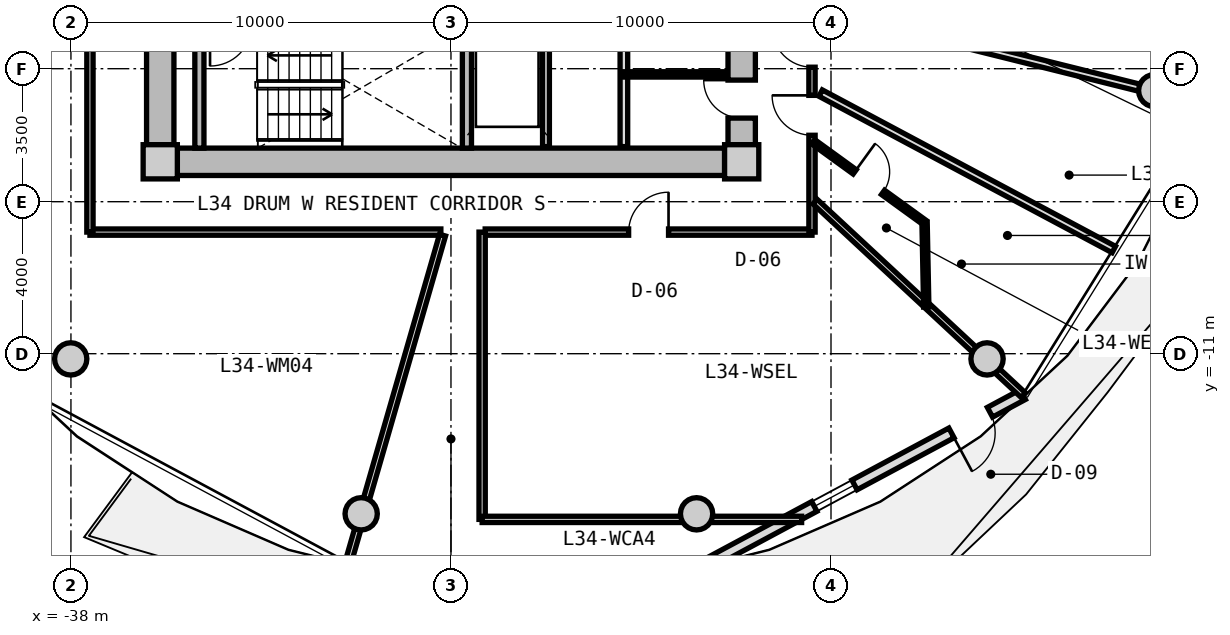
"""IFC4 building model, lengths in metres.
Left out: names, types, materials, properties, quantities, classifications, styles, units other than length and angle.
Written with IfcOpenShell. Run it as: python <this file> out.ifc"""

import sys

from ifc_helpers import new_model, si_unit, direction, frame, frame_2d, origin, origin_2d, place, context, subcontext, project, spatial, rectangle, circle, extrude, source, transform, mapped, element, fill, save


model = new_model("IFC4")
c1 = context("Model", 3, precision=1e-05, world=origin(), true_north=direction((0.0, 1.0)))
c2 = subcontext(c1, "Body", "Model", "MODEL_VIEW")
j1 = project(units=[si_unit("LENGTHUNIT", "METRE"), si_unit("PLANEANGLEUNIT", "RADIAN")], contexts=[c1])
p1 = place(None, origin())
s1 = spatial("IfcSite", under=j1, at=p1, CompositionType="ELEMENT")
p2 = place(p1, origin())
s2 = spatial("IfcBuilding", under=s1, at=p2, CompositionType="ELEMENT")
p3 = place(p2, frame((0.0, 0.0, 111.5)))
s3 = spatial("IfcBuildingStorey", under=s2, at=p3, CompositionType="ELEMENT", Elevation=111.5)
m1 = source(origin(), c2, "Body", "SweptSolid", [
    extrude(rectangle(XDim=0.9, YDim=0.9, at=origin_2d()), origin(), (0.0, 0.0, 1.0), 3.05),
])
for number, where, z_axis, x_axis in (
    (1, (-35.65, -5.95, 0.0), (0.0, 0.0, 1.0), (1.0, 0.0, 0.0)),
    (2, (-20.35, -5.95, 0.0), (0.0, 0.0, 1.0), (1.0, 0.0, 0.0)),
):
    element("IfcColumn", number, at=place(p3, frame(where, z_axis=z_axis, x_axis=x_axis)), inside=s3, PredefinedType="COLUMN", context=c2, shape_type="MappedRepresentation", body=[
        mapped(m1, transform((0.0, 0.0, 0.0), x_axis=(1.0, 0.0, 0.0), y_axis=(0.0, 1.0, 0.0), z_axis=(0.0, 0.0, 1.0), scale=1.0)),
    ])
m2 = source(origin(), c2, "Body", "SweptSolid", [
    extrude(rectangle(XDim=14.4, YDim=0.72, at=frame_2d((7.2, 0.0))), origin(), (0.0, 0.0, 1.0), 2.79),
])
p4 = place(p3, frame((-20.8, -5.95, 0.0), z_axis=(0.0, 0.0, 1.0), x_axis=(-1.0, 0.0, 0.0)))
e3 = element("IfcWall", 3, at=p4, inside=s3, PredefinedType="SHEAR", context=c2, shape_type="MappedRepresentation", body=[
    mapped(m2, transform((0.0, 0.0, 0.0), x_axis=(1.0, 0.0, 0.0), y_axis=(0.0, 1.0, 0.0), z_axis=(0.0, 0.0, 1.0), scale=1.0)),
])
m3 = source(origin(), c2, "Body", "SweptSolid", [
    extrude(rectangle(XDim=11.0, YDim=0.72, at=frame_2d((5.5, 0.0))), origin(), (0.0, 0.0, 1.0), 2.79),
])
p5 = place(p3, frame((-35.65, -5.5, 0.0), z_axis=(0.0, 0.0, 1.0), x_axis=(0.0, 1.0, 0.0)))
e4 = element("IfcWall", 4, at=p5, inside=s3, PredefinedType="SHEAR", context=c2, shape_type="MappedRepresentation", body=[
    mapped(m3, transform((0.0, 0.0, 0.0), x_axis=(1.0, 0.0, 0.0), y_axis=(0.0, 1.0, 0.0), z_axis=(0.0, 0.0, 1.0), scale=1.0)),
])
p6 = place(p5, frame((3.8, 0.0, 0.0)))
e5 = element("IfcOpeningElement", 5, at=p6, cuts=e4, PredefinedType="OPENING", context=c2, shape_type="SweptSolid", body=[
    extrude(rectangle(XDim=1.2, YDim=2.15, at=frame_2d((0.6, 1.075))), frame((0.0, 0.37, 0.0), z_axis=(0.0, -1.0, 0.0), x_axis=(1.0, 0.0, 0.0)), (0.0, 0.0, 1.0), 0.74),
])
p7 = place(p3, frame((-20.35, 5.5, 0.0), z_axis=(0.0, 0.0, 1.0), x_axis=(0.0, -1.0, 0.0)))
e6 = element("IfcWall", 6, at=p7, inside=s3, PredefinedType="SHEAR", context=c2, shape_type="MappedRepresentation", body=[
    mapped(m3, transform((0.0, 0.0, 0.0), x_axis=(1.0, 0.0, 0.0), y_axis=(0.0, 1.0, 0.0), z_axis=(0.0, 0.0, 1.0), scale=1.0)),
])
p8 = place(p7, frame((5.65, 0.0, 0.0)))
e7 = element("IfcOpeningElement", 7, at=p8, cuts=e6, PredefinedType="OPENING", context=c2, shape_type="SweptSolid", body=[
    extrude(rectangle(XDim=1.2, YDim=2.15, at=frame_2d((0.6, 1.075))), frame((0.0, 0.37, 0.0), z_axis=(0.0, -1.0, 0.0), x_axis=(1.0, 0.0, 0.0)), (0.0, 0.0, 1.0), 0.74),
])
p9 = place(p7, frame((9.3, 0.0, 0.0)))
e8 = element("IfcOpeningElement", 8, at=p9, cuts=e6, PredefinedType="OPENING", context=c2, shape_type="SweptSolid", body=[
    extrude(rectangle(XDim=1.0, YDim=2.1, at=frame_2d((0.5, 1.05))), frame((0.0, 0.37, 0.0), z_axis=(0.0, -1.0, 0.0), x_axis=(1.0, 0.0, 0.0)), (0.0, 0.0, 1.0), 0.74),
])
m4 = source(origin(), c2, "Body", "SweptSolid", [
    extrude(circle(Radius=0.425, at=origin_2d()), origin(), (0.0, 0.0, 1.0), 3.05),
])
for number, where, z_axis, x_axis in (
    (9, (-38.006, -11.137, 0.0), (0.0, 0.0, 1.0), (1.0, 0.0, 0.0)),
    (10, (-30.363, -15.213, 0.0), (0.0, 0.0, 1.0), (1.0, 0.0, 0.0)),
    (11, (-21.537, -15.213, 0.0), (0.0, 0.0, 1.0), (1.0, 0.0, 0.0)),
    (12, (-13.894, -11.137, 0.0), (0.0, 0.0, 1.0), (1.0, 0.0, 0.0)),
    (13, (-9.481, -4.076, 0.0), (0.0, 0.0, 1.0), (1.0, 0.0, 0.0)),
):
    element("IfcColumn", number, at=place(p3, frame(where, z_axis=z_axis, x_axis=x_axis)), inside=s3, PredefinedType="COLUMN", context=c2, shape_type="MappedRepresentation", body=[
        mapped(m4, transform((0.0, 0.0, 0.0), x_axis=(1.0, 0.0, 0.0), y_axis=(0.0, 1.0, 0.0), z_axis=(0.0, 0.0, 1.0), scale=1.0)),
    ])
m5 = source(origin(), c2, "Body", "SweptSolid", [
    extrude(rectangle(XDim=9.351, YDim=0.29, at=frame_2d((4.675, 0.0))), origin(), (0.0, 0.0, 1.0), 2.79),
])
p10 = place(p3, frame((-12.953, -12.077, 0.0), z_axis=(0.0, 0.0, 1.0), x_axis=(-0.881184411073, -0.472772708267, 0.0)))
e14 = element("IfcWall", 14, at=p10, inside=s3, PredefinedType="SOLIDWALL", context=c2, shape_type="MappedRepresentation", body=[
    mapped(m5, transform((0.0, 0.0, 0.0), x_axis=(1.0, 0.0, 0.0), y_axis=(0.0, 1.0, 0.0), z_axis=(0.0, 0.0, 1.0), scale=1.0)),
])
p11 = place(p10, frame((0.98, 0.0, 0.0)))
e15 = element("IfcOpeningElement", 15, at=p11, cuts=e14, PredefinedType="OPENING", context=c2, shape_type="SweptSolid", body=[
    extrude(rectangle(XDim=1.15, YDim=2.25, at=frame_2d((0.575, 1.125))), frame((0.0, 0.155, 0.0), z_axis=(0.0, -1.0, 0.0), x_axis=(1.0, 0.0, 0.0)), (0.0, 0.0, 1.0), 0.31),
])
p12 = place(p10, frame((5.025, 0.0, 0.85)))
e16 = element("IfcOpeningElement", 16, at=p12, cuts=e14, PredefinedType="OPENING", context=c2, shape_type="SweptSolid", body=[
    extrude(rectangle(XDim=1.2, YDim=1.5, at=frame_2d((0.6, 0.75))), frame((0.0, 0.155, 0.0), z_axis=(0.0, -1.0, 0.0), x_axis=(1.0, 0.0, 0.0)), (0.0, 0.0, 1.0), 0.31),
])
m6 = source(origin(), c2, "Body", "SweptSolid", [
    extrude(rectangle(XDim=3.14, YDim=0.24, at=frame_2d((1.57, 0.0))), origin(), (0.0, 0.0, 1.0), 2.79),
])
for number, where, z_axis, x_axis in (
    (17, (-34.62, -5.59, 0.0), (0.0, 0.0, 1.0), (0.0, 1.0, 0.0)),
    (18, (-27.58, -5.59, 0.0), (0.0, 0.0, 1.0), (0.0, 1.0, 0.0)),
):
    element("IfcWall", number, at=place(p3, frame(where, z_axis=z_axis, x_axis=x_axis)), inside=s3, PredefinedType="PARTITIONING", context=c2, shape_type="MappedRepresentation", body=[
        mapped(m6, transform((0.0, 0.0, 0.0), x_axis=(1.0, 0.0, 0.0), y_axis=(0.0, 1.0, 0.0), z_axis=(0.0, 0.0, 1.0), scale=1.0)),
    ])
m7 = source(origin(), c2, "Body", "SweptSolid", [
    extrude(rectangle(XDim=3.8, YDim=0.2, at=frame_2d((1.9, 0.0))), origin(), (0.0, 0.0, 1.0), 2.775),
])
p13 = place(p3, frame((-23.45, -5.55, 0.0), z_axis=(0.0, 0.0, 1.0), x_axis=(0.0, 1.0, 0.0)))
e19 = element("IfcWall", 19, at=p13, inside=s3, PredefinedType="PARTITIONING", context=c2, shape_type="MappedRepresentation", body=[
    mapped(m7, transform((0.0, 0.0, 0.0), x_axis=(1.0, 0.0, 0.0), y_axis=(0.0, 1.0, 0.0), z_axis=(0.0, 0.0, 1.0), scale=1.0)),
])
m8 = source(origin(), c2, "Body", "SweptSolid", [
    extrude(rectangle(XDim=3.22, YDim=0.18, at=frame_2d((1.61, 0.0))), origin(), (0.0, 0.0, 1.0), 2.775),
])
p14 = place(p3, frame((-25.5, -5.55, 0.0), z_axis=(0.0, 0.0, 1.0), x_axis=(0.0, 1.0, 0.0)))
e20 = element("IfcWall", 20, at=p14, inside=s3, PredefinedType="PARTITIONING", context=c2, shape_type="MappedRepresentation", body=[
    mapped(m8, transform((0.0, 0.0, 0.0), x_axis=(1.0, 0.0, 0.0), y_axis=(0.0, 1.0, 0.0), z_axis=(0.0, 0.0, 1.0), scale=1.0)),
])
m9 = source(origin(), c2, "Body", "SweptSolid", [
    extrude(rectangle(XDim=2.7, YDim=0.14, at=frame_2d((1.35, 0.0))), origin(), (0.0, 0.0, 1.0), 2.775),
])
p15 = place(p3, frame((-23.45, -3.65, 0.0), z_axis=(0.0, 0.0, 1.0), x_axis=(1.0, 0.0, 0.0)))
e21 = element("IfcWall", 21, at=p15, inside=s3, PredefinedType="PARTITIONING", context=c2, shape_type="MappedRepresentation", body=[
    mapped(m9, transform((0.0, 0.0, 0.0), x_axis=(1.0, 0.0, 0.0), y_axis=(0.0, 1.0, 0.0), z_axis=(0.0, 0.0, 1.0), scale=1.0)),
])
m10 = source(origin(), c2, "Body", "SweptSolid", [
    extrude(rectangle(XDim=8.6, YDim=0.165, at=frame_2d((4.3, 0.0))), origin(), (0.0, 0.0, 1.0), 2.775),
])
p16 = place(p3, frame((-18.5, -7.8, 0.0), z_axis=(0.0, 0.0, 1.0), x_axis=(-1.0, 0.0, 0.0)))
e22 = element("IfcWall", 22, at=p16, inside=s3, PredefinedType="PARTITIONING", context=c2, shape_type="MappedRepresentation", body=[
    mapped(m10, transform((0.0, 0.0, 0.0), x_axis=(1.0, 0.0, 0.0), y_axis=(0.0, 1.0, 0.0), z_axis=(0.0, 0.0, 1.0), scale=1.0)),
])
p17 = place(p16, frame((3.775, 0.0, 0.0)))
e23 = element("IfcOpeningElement", 23, at=p17, cuts=e22, PredefinedType="OPENING", context=c2, shape_type="SweptSolid", body=[
    extrude(rectangle(XDim=1.05, YDim=2.15, at=frame_2d((0.525, 1.075))), frame((0.0, 0.093, 0.0), z_axis=(0.0, -1.0, 0.0), x_axis=(1.0, 0.0, 0.0)), (0.0, 0.0, 1.0), 0.185),
])
m11 = source(origin(), c2, "Body", "SweptSolid", [
    extrude(rectangle(XDim=9.234, YDim=0.165, at=frame_2d((4.617, 0.0))), origin(), (0.0, 0.0, 1.0), 2.775),
])
p18 = place(p3, frame((-28.266, -7.8, 0.0), z_axis=(0.0, 0.0, 1.0), x_axis=(-1.0, 0.0, 0.0)))
e24 = element("IfcWall", 24, at=p18, inside=s3, PredefinedType="PARTITIONING", context=c2, shape_type="MappedRepresentation", body=[
    mapped(m11, transform((0.0, 0.0, 0.0), x_axis=(1.0, 0.0, 0.0), y_axis=(0.0, 1.0, 0.0), z_axis=(0.0, 0.0, 1.0), scale=1.0)),
])
m12 = source(origin(), c2, "Body", "SweptSolid", [
    extrude(rectangle(XDim=15.6, YDim=0.165, at=frame_2d((7.8, 0.0))), origin(), (0.0, 0.0, 1.0), 2.775),
])
p19 = place(p3, frame((-37.5, -7.8, 0.0), z_axis=(0.0, 0.0, 1.0), x_axis=(0.0, 1.0, 0.0)))
e25 = element("IfcWall", 25, at=p19, inside=s3, PredefinedType="PARTITIONING", context=c2, shape_type="MappedRepresentation", body=[
    mapped(m12, transform((0.0, 0.0, 0.0), x_axis=(1.0, 0.0, 0.0), y_axis=(0.0, 1.0, 0.0), z_axis=(0.0, 0.0, 1.0), scale=1.0)),
])
p20 = place(p19, frame((7.175, 0.0, 0.0)))
e26 = element("IfcOpeningElement", 26, at=p20, cuts=e25, PredefinedType="OPENING", context=c2, shape_type="SweptSolid", body=[
    extrude(rectangle(XDim=1.25, YDim=2.2, at=frame_2d((0.625, 1.1))), frame((0.0, 0.093, 0.0), z_axis=(0.0, -1.0, 0.0), x_axis=(1.0, 0.0, 0.0)), (0.0, 0.0, 1.0), 0.185),
])
p21 = place(p3, frame((-18.5, 7.8, 0.0), z_axis=(0.0, 0.0, 1.0), x_axis=(0.0, -1.0, 0.0)))
e27 = element("IfcWall", 27, at=p21, inside=s3, PredefinedType="PARTITIONING", context=c2, shape_type="MappedRepresentation", body=[
    mapped(m12, transform((0.0, 0.0, 0.0), x_axis=(1.0, 0.0, 0.0), y_axis=(0.0, 1.0, 0.0), z_axis=(0.0, 0.0, 1.0), scale=1.0)),
])
p22 = place(p21, frame((12.002, 0.0, 0.0)))
e28 = element("IfcOpeningElement", 28, at=p22, cuts=e27, PredefinedType="OPENING", context=c2, shape_type="SweptSolid", body=[
    extrude(rectangle(XDim=1.05, YDim=2.15, at=frame_2d((0.525, 1.075))), frame((0.0, 0.093, 0.0), z_axis=(0.0, -1.0, 0.0), x_axis=(1.0, 0.0, 0.0)), (0.0, 0.0, 1.0), 0.185),
])
p23 = place(p21, frame((10.211, 0.0, 0.0)))
e29 = element("IfcOpeningElement", 29, at=p23, cuts=e27, PredefinedType="OPENING", context=c2, shape_type="SweptSolid", body=[
    extrude(rectangle(XDim=1.05, YDim=2.15, at=frame_2d((0.525, 1.075))), frame((0.0, 0.093, 0.0), z_axis=(0.0, -1.0, 0.0), x_axis=(1.0, 0.0, 0.0)), (0.0, 0.0, 1.0), 0.185),
])
p24 = place(p21, frame((8.212, 0.0, 0.0)))
e30 = element("IfcOpeningElement", 30, at=p24, cuts=e27, PredefinedType="OPENING", context=c2, shape_type="SweptSolid", body=[
    extrude(rectangle(XDim=1.05, YDim=2.15, at=frame_2d((0.525, 1.075))), frame((0.0, 0.093, 0.0), z_axis=(0.0, -1.0, 0.0), x_axis=(1.0, 0.0, 0.0)), (0.0, 0.0, 1.0), 0.185),
])
p25 = place(p21, frame((6.291, 0.0, 0.0)))
e31 = element("IfcOpeningElement", 31, at=p25, cuts=e27, PredefinedType="OPENING", context=c2, shape_type="SweptSolid", body=[
    extrude(rectangle(XDim=1.05, YDim=2.15, at=frame_2d((0.525, 1.075))), frame((0.0, 0.093, 0.0), z_axis=(0.0, -1.0, 0.0), x_axis=(1.0, 0.0, 0.0)), (0.0, 0.0, 1.0), 0.185),
])
p26 = place(p21, frame((4.739, 0.0, 0.0)))
e32 = element("IfcOpeningElement", 32, at=p26, cuts=e27, PredefinedType="OPENING", context=c2, shape_type="SweptSolid", body=[
    extrude(rectangle(XDim=0.92, YDim=2.1, at=frame_2d((0.46, 1.05))), frame((0.0, 0.093, 0.0), z_axis=(0.0, -1.0, 0.0), x_axis=(1.0, 0.0, 0.0)), (0.0, 0.0, 1.0), 0.185),
])
p27 = place(p21, frame((2.096, 0.0, 0.0)))
e33 = element("IfcOpeningElement", 33, at=p27, cuts=e27, PredefinedType="OPENING", context=c2, shape_type="SweptSolid", body=[
    extrude(rectangle(XDim=0.92, YDim=2.1, at=frame_2d((0.46, 1.05))), frame((0.0, 0.093, 0.0), z_axis=(0.0, -1.0, 0.0), x_axis=(1.0, 0.0, 0.0)), (0.0, 0.0, 1.0), 0.185),
])
m13 = source(origin(), c2, "Body", "SweptSolid", [
    extrude(rectangle(XDim=8.989, YDim=0.165, at=frame_2d((4.495, 0.0))), origin(), (0.0, 0.0, 1.0), 2.275),
])
p28 = place(p3, frame((-28.222, -7.88, 0.0), z_axis=(0.0, 0.0, 1.0), x_axis=(-0.27702323008, -0.960863221274, 0.0)))
e34 = element("IfcWall", 34, at=p28, inside=s3, PredefinedType="PARTITIONING", context=c2, shape_type="MappedRepresentation", body=[
    mapped(m13, transform((0.0, 0.0, 0.0), x_axis=(1.0, 0.0, 0.0), y_axis=(0.0, 1.0, 0.0), z_axis=(0.0, 0.0, 1.0), scale=1.0)),
])
m14 = source(origin(), c2, "Body", "SweptSolid", [
    extrude(rectangle(XDim=7.482, YDim=0.165, at=frame_2d((3.741, 0.0))), origin(), (0.0, 0.0, 1.0), 2.275),
])
p29 = place(p3, frame((-18.42, -6.998, 0.0), z_axis=(0.0, 0.0, 1.0), x_axis=(0.732508698043, -0.680757671489, 0.0)))
e35 = element("IfcWall", 35, at=p29, inside=s3, PredefinedType="PARTITIONING", context=c2, shape_type="MappedRepresentation", body=[
    mapped(m14, transform((0.0, 0.0, 0.0), x_axis=(1.0, 0.0, 0.0), y_axis=(0.0, 1.0, 0.0), z_axis=(0.0, 0.0, 1.0), scale=1.0)),
])
m15 = source(origin(), c2, "Body", "SweptSolid", [
    extrude(rectangle(XDim=7.56, YDim=0.165, at=frame_2d((3.78, 0.0))), origin(), (0.0, 0.0, 1.0), 2.775),
])
p30 = place(p3, frame((-27.18, -15.36, 0.0), z_axis=(0.0, 0.0, 1.0), x_axis=(0.0, 1.0, 0.0)))
e36 = element("IfcWall", 36, at=p30, inside=s3, PredefinedType="PARTITIONING", context=c2, shape_type="MappedRepresentation", body=[
    mapped(m15, transform((0.0, 0.0, 0.0), x_axis=(1.0, 0.0, 0.0), y_axis=(0.0, 1.0, 0.0), z_axis=(0.0, 0.0, 1.0), scale=1.0)),
])
m16 = source(origin(), c2, "Body", "SweptSolid", [
    extrude(rectangle(XDim=8.407, YDim=0.165, at=frame_2d((4.204, 0.0))), origin(), (0.0, 0.0, 1.0), 2.275),
])
p31 = place(p3, frame((-27.18, -15.36, 0.0), z_axis=(0.0, 0.0, 1.0), x_axis=(1.0, 0.0, 0.0)))
e37 = element("IfcWall", 37, at=p31, inside=s3, PredefinedType="PARTITIONING", context=c2, shape_type="MappedRepresentation", body=[
    mapped(m16, transform((0.0, 0.0, 0.0), x_axis=(1.0, 0.0, 0.0), y_axis=(0.0, 1.0, 0.0), z_axis=(0.0, 0.0, 1.0), scale=1.0)),
])
m17 = source(origin(), c2, "Body", "SweptSolid", [
    extrude(rectangle(XDim=10.556, YDim=0.19, at=frame_2d((5.278, 0.0))), origin(), (0.0, 0.0, 1.0), 2.275),
])
p32 = place(p3, frame((-18.42, -1.875, 0.0), z_axis=(0.0, 0.0, 1.0), x_axis=(0.970363857851, -0.241648470667, 0.0)))
e38 = element("IfcWall", 38, at=p32, inside=s3, PredefinedType="PARTITIONING", context=c2, shape_type="MappedRepresentation", body=[
    mapped(m17, transform((0.0, 0.0, 0.0), x_axis=(1.0, 0.0, 0.0), y_axis=(0.0, 1.0, 0.0), z_axis=(0.0, 0.0, 1.0), scale=1.0)),
])
m18 = source(origin(), c2, "Body", "SweptSolid", [
    extrude(rectangle(XDim=8.744, YDim=0.19, at=frame_2d((4.372, 0.0))), origin(), (0.0, 0.0, 1.0), 2.775),
])
p33 = place(p3, frame((-18.273, -4.142, 0.0), z_axis=(0.0, 0.0, 1.0), x_axis=(0.882252449936, -0.470776607938, 0.0)))
e39 = element("IfcWall", 39, at=p33, inside=s3, PredefinedType="PARTITIONING", context=c2, shape_type="MappedRepresentation", body=[
    mapped(m18, transform((0.0, 0.0, 0.0), x_axis=(1.0, 0.0, 0.0), y_axis=(0.0, 1.0, 0.0), z_axis=(0.0, 0.0, 1.0), scale=1.0)),
])
m19 = source(origin(), c2, "Body", "SweptSolid", [
    extrude(rectangle(XDim=3.621, YDim=0.14, at=frame_2d((1.811, 0.0))), origin(), (0.0, 0.0, 1.0), 2.775),
])
p34 = place(p3, frame((-18.47, -5.422, 0.0), z_axis=(0.0, 0.0, 1.0), x_axis=(0.80968252222, -0.586868139544, 0.0)))
e40 = element("IfcWall", 40, at=p34, inside=s3, PredefinedType="PARTITIONING", context=c2, shape_type="MappedRepresentation", body=[
    mapped(m19, transform((0.0, 0.0, 0.0), x_axis=(1.0, 0.0, 0.0), y_axis=(0.0, 1.0, 0.0), z_axis=(0.0, 0.0, 1.0), scale=1.0)),
])
p35 = place(p34, frame((1.351, 0.0, 0.0)))
e41 = element("IfcOpeningElement", 41, at=p35, cuts=e40, PredefinedType="OPENING", context=c2, shape_type="SweptSolid", body=[
    extrude(rectangle(XDim=0.92, YDim=2.1, at=frame_2d((0.46, 1.05))), frame((0.0, 0.08, 0.0), z_axis=(0.0, -1.0, 0.0), x_axis=(1.0, 0.0, 0.0)), (0.0, 0.0, 1.0), 0.16),
])
m20 = source(origin(), c2, "Body", "SweptSolid", [
    extrude(rectangle(XDim=2.225, YDim=0.14, at=frame_2d((1.112, 0.0))), origin(), (0.0, 0.0, 1.0), 2.775),
])
p36 = place(p3, frame((-15.538, -7.547, 0.0), z_axis=(0.0, 0.0, 1.0), x_axis=(0.019971869027, -0.999800542332, 0.0)))
e42 = element("IfcWall", 42, at=p36, inside=s3, PredefinedType="PARTITIONING", context=c2, shape_type="MappedRepresentation", body=[
    mapped(m20, transform((0.0, 0.0, 0.0), x_axis=(1.0, 0.0, 0.0), y_axis=(0.0, 1.0, 0.0), z_axis=(0.0, 0.0, 1.0), scale=1.0)),
])
m21 = source(origin(), c2, "Body", "SweptSolid", [
    extrude(rectangle(XDim=1.15, YDim=2.25, at=frame_2d((0.575, 1.125))), frame((0.0, 0.025, 0.0), z_axis=(0.0, -1.0, 0.0), x_axis=(1.0, 0.0, 0.0)), (0.0, 0.0, 1.0), 0.05),
])
p37 = place(p11, origin())
e43 = element("IfcDoor", 43, at=p37, inside=s3, OperationType="SINGLE_SWING_RIGHT", PredefinedType="DOOR", context=c2, shape_type="MappedRepresentation", body=[
    mapped(m21, transform((0.0, 0.0, 0.0), x_axis=(1.0, 0.0, 0.0), y_axis=(0.0, 1.0, 0.0), z_axis=(0.0, 0.0, 1.0), scale=1.0)),
])
fill(e15, e43)
m22 = source(origin(), c2, "Body", "SweptSolid", [
    extrude(rectangle(XDim=1.2, YDim=1.5, at=frame_2d((0.6, 0.75))), frame((0.0, 0.03, 0.0), z_axis=(0.0, -1.0, 0.0), x_axis=(1.0, 0.0, 0.0)), (0.0, 0.0, 1.0), 0.06),
])
p38 = place(p12, origin())
e44 = element("IfcWindow", 44, at=p38, inside=s3, PartitioningType="SINGLE_PANEL", PredefinedType="WINDOW", context=c2, shape_type="MappedRepresentation", body=[
    mapped(m22, transform((0.0, 0.0, 0.0), x_axis=(1.0, 0.0, 0.0), y_axis=(0.0, 1.0, 0.0), z_axis=(0.0, 0.0, 1.0), scale=1.0)),
])
fill(e16, e44)
m23 = source(origin(), c2, "Body", "SweptSolid", [
    extrude(rectangle(XDim=1.0, YDim=2.1, at=frame_2d((0.5, 1.05))), frame((0.0, 0.025, 0.0), z_axis=(0.0, -1.0, 0.0), x_axis=(1.0, 0.0, 0.0)), (0.0, 0.0, 1.0), 0.05),
])
p39 = place(p9, frame((1.0, 0.0, 0.0), z_axis=(0.0, 0.0, 1.0), x_axis=(-1.0, 0.0, 0.0)))
e45 = element("IfcDoor", 45, at=p39, inside=s3, OperationType="SINGLE_SWING_RIGHT", PredefinedType="DOOR", context=c2, shape_type="MappedRepresentation", body=[
    mapped(m23, transform((0.0, 0.0, 0.0), x_axis=(1.0, 0.0, 0.0), y_axis=(0.0, 1.0, 0.0), z_axis=(0.0, 0.0, 1.0), scale=1.0)),
])
fill(e8, e45)
m24 = source(origin(), c2, "Body", "SweptSolid", [
    extrude(rectangle(XDim=1.05, YDim=2.15, at=frame_2d((0.525, 1.075))), frame((0.0, 0.025, 0.0), z_axis=(0.0, -1.0, 0.0), x_axis=(1.0, 0.0, 0.0)), (0.0, 0.0, 1.0), 0.05),
])
p40 = place(p17, frame((1.05, 0.0, 0.0), z_axis=(0.0, 0.0, 1.0), x_axis=(-1.0, 0.0, 0.0)))
e46 = element("IfcDoor", 46, at=p40, inside=s3, OperationType="SINGLE_SWING_RIGHT", PredefinedType="DOOR", context=c2, shape_type="MappedRepresentation", body=[
    mapped(m24, transform((0.0, 0.0, 0.0), x_axis=(1.0, 0.0, 0.0), y_axis=(0.0, 1.0, 0.0), z_axis=(0.0, 0.0, 1.0), scale=1.0)),
])
fill(e23, e46)
p41 = place(p22, frame((1.05, 0.0, 0.0), z_axis=(0.0, 0.0, 1.0), x_axis=(-1.0, 0.0, 0.0)))
e47 = element("IfcDoor", 47, at=p41, inside=s3, OperationType="SINGLE_SWING_RIGHT", PredefinedType="DOOR", context=c2, shape_type="MappedRepresentation", body=[
    mapped(m24, transform((0.0, 0.0, 0.0), x_axis=(1.0, 0.0, 0.0), y_axis=(0.0, 1.0, 0.0), z_axis=(0.0, 0.0, 1.0), scale=1.0)),
])
fill(e28, e47)
m25 = source(origin(), c2, "Body", "SweptSolid", [
    extrude(rectangle(XDim=0.92, YDim=2.1, at=frame_2d((0.46, 1.05))), frame((0.0, 0.025, 0.0), z_axis=(0.0, -1.0, 0.0), x_axis=(1.0, 0.0, 0.0)), (0.0, 0.0, 1.0), 0.05),
])
p42 = place(p35, origin())
e48 = element("IfcDoor", 48, at=p42, inside=s3, OperationType="SINGLE_SWING_LEFT", PredefinedType="DOOR", context=c2, shape_type="MappedRepresentation", body=[
    mapped(m25, transform((0.0, 0.0, 0.0), x_axis=(1.0, 0.0, 0.0), y_axis=(0.0, 1.0, 0.0), z_axis=(0.0, 0.0, 1.0), scale=1.0)),
])
fill(e41, e48)
p43 = place(p23, frame((1.05, 0.0, 0.0), z_axis=(0.0, 0.0, 1.0), x_axis=(-1.0, 0.0, 0.0)))
e49 = element("IfcDoor", 49, at=p43, inside=s3, OperationType="SINGLE_SWING_RIGHT", PredefinedType="DOOR", context=c2, shape_type="MappedRepresentation", body=[
    mapped(m24, transform((0.0, 0.0, 0.0), x_axis=(1.0, 0.0, 0.0), y_axis=(0.0, 1.0, 0.0), z_axis=(0.0, 0.0, 1.0), scale=1.0)),
])
fill(e29, e49)
save(model, sys.argv[1])
